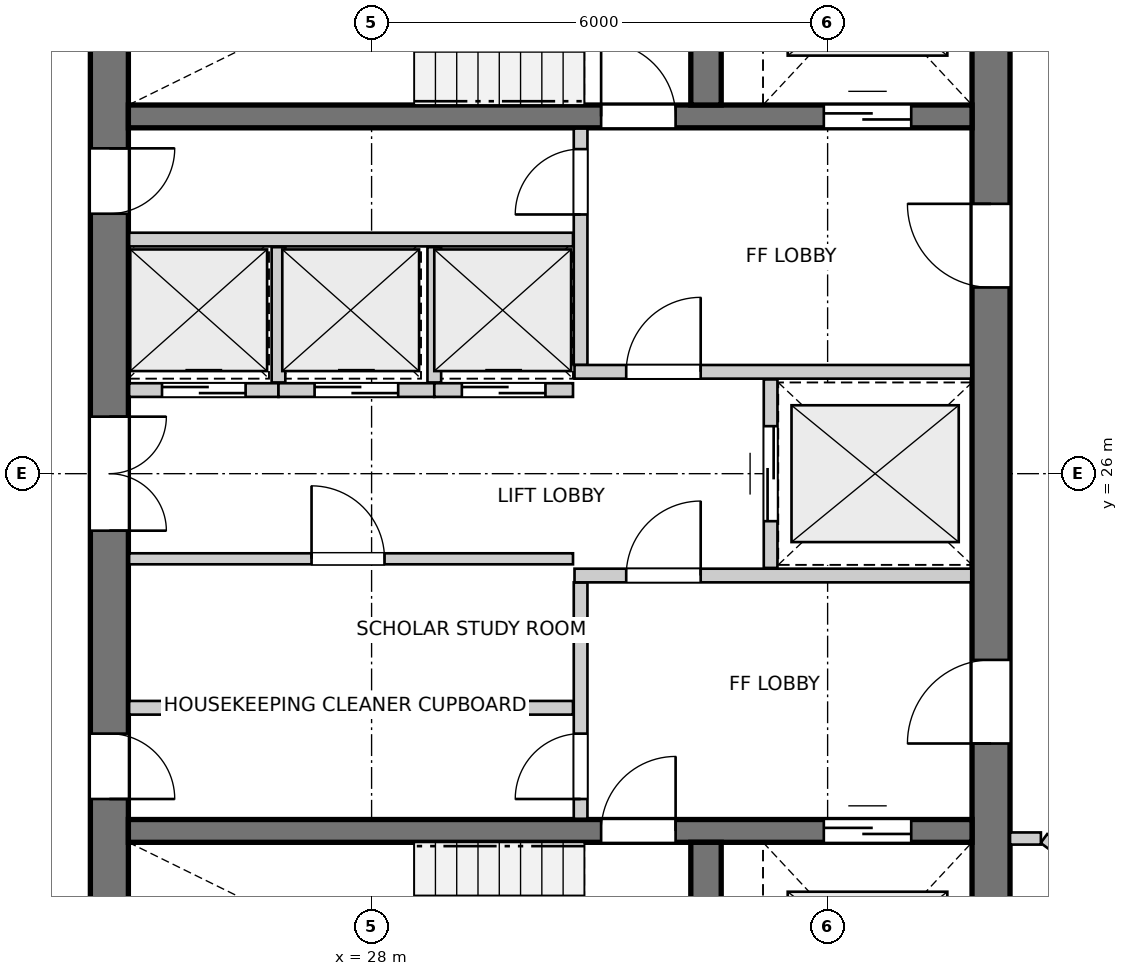
"""IFC4 building model, lengths in metres.
Left out: names, types, materials, properties, quantities, classifications, styles, units other than length and angle.
Written with IfcOpenShell. Run it as: python <this file> out.ifc"""

import sys

from ifc_helpers import new_model, si_unit, direction, frame, frame_2d, origin, place, context, subcontext, project, spatial, rectangle, extrude, source, transform, mapped, element, fill, save


model = new_model("IFC4")
c1 = context("Model", 3, precision=1e-05, world=origin(), true_north=direction((0.0, 1.0)))
c2 = subcontext(c1, "Body", "Model", "MODEL_VIEW")
j1 = project(units=[si_unit("LENGTHUNIT", "METRE"), si_unit("PLANEANGLEUNIT", "RADIAN")], contexts=[c1])
p1 = place(None, origin())
s1 = spatial("IfcSite", under=j1, at=p1, CompositionType="ELEMENT")
p2 = place(p1, origin())
s2 = spatial("IfcBuilding", under=s1, at=p2, CompositionType="ELEMENT")
p3 = place(p2, frame((0.0, 0.0, 198.8)))
s3 = spatial("IfcBuildingStorey", under=s2, at=p3, CompositionType="ELEMENT", Elevation=198.8)
p4 = place(p3, frame((24.55, 33.8, 0.0), z_axis=(0.0, 0.0, 1.0), x_axis=(0.0, -1.0, 0.0)))
e1 = element("IfcWall", 1, at=p4, inside=s3, PredefinedType="SHEAR", context=c2, shape_type="SweptSolid", body=[
    extrude(rectangle(XDim=15.6, YDim=0.5, at=frame_2d((7.8, 0.0))), origin(), (0.0, 0.0, 1.0), 2.96),
])
p5 = place(p4, frame((7.05, 0.0, 0.0)))
e2 = element("IfcOpeningElement", 2, at=p5, cuts=e1, PredefinedType="OPENING", context=c2, shape_type="SweptSolid", body=[
    extrude(rectangle(XDim=1.5, YDim=2.15, at=frame_2d((0.75, 1.075))), frame((0.0, 0.26, 0.0), z_axis=(0.0, -1.0, 0.0), x_axis=(1.0, 0.0, 0.0)), (0.0, 0.0, 1.0), 0.52),
])
p6 = place(p4, frame((3.52, 0.0, 0.0)))
e3 = element("IfcOpeningElement", 3, at=p6, cuts=e1, PredefinedType="OPENING", context=c2, shape_type="SweptSolid", body=[
    extrude(rectangle(XDim=0.86, YDim=2.05, at=frame_2d((0.43, 1.025))), frame((0.0, 0.26, 0.0), z_axis=(0.0, -1.0, 0.0), x_axis=(1.0, 0.0, 0.0)), (0.0, 0.0, 1.0), 0.52),
])
p7 = place(p4, frame((11.22, 0.0, 0.0)))
e4 = element("IfcOpeningElement", 4, at=p7, cuts=e1, PredefinedType="OPENING", context=c2, shape_type="SweptSolid", body=[
    extrude(rectangle(XDim=0.86, YDim=2.05, at=frame_2d((0.43, 1.025))), frame((0.0, 0.26, 0.0), z_axis=(0.0, -1.0, 0.0), x_axis=(1.0, 0.0, 0.0)), (0.0, 0.0, 1.0), 0.52),
])
p8 = place(p3, frame((36.15, 18.2, 0.0), z_axis=(0.0, 0.0, 1.0), x_axis=(0.0, 1.0, 0.0)))
e5 = element("IfcWall", 5, at=p8, inside=s3, PredefinedType="SHEAR", context=c2, shape_type="SweptSolid", body=[
    extrude(rectangle(XDim=15.6, YDim=0.5, at=frame_2d((7.8, 0.0))), origin(), (0.0, 0.0, 1.0), 2.96),
])
p9 = place(p8, frame((4.25, 0.0, 0.0)))
e6 = element("IfcOpeningElement", 6, at=p9, cuts=e5, PredefinedType="OPENING", context=c2, shape_type="SweptSolid", body=[
    extrude(rectangle(XDim=1.1, YDim=2.15, at=frame_2d((0.55, 1.075))), frame((0.0, 0.26, 0.0), z_axis=(0.0, -1.0, 0.0), x_axis=(1.0, 0.0, 0.0)), (0.0, 0.0, 1.0), 0.52),
])
p10 = place(p8, frame((10.25, 0.0, 0.0)))
e7 = element("IfcOpeningElement", 7, at=p10, cuts=e5, PredefinedType="OPENING", context=c2, shape_type="SweptSolid", body=[
    extrude(rectangle(XDim=1.1, YDim=2.15, at=frame_2d((0.55, 1.075))), frame((0.0, 0.26, 0.0), z_axis=(0.0, -1.0, 0.0), x_axis=(1.0, 0.0, 0.0)), (0.0, 0.0, 1.0), 0.52),
])
p11 = place(p3, frame((24.8, 21.3, 0.0), z_axis=(0.0, 0.0, 1.0), x_axis=(1.0, 0.0, 0.0)))
e8 = element("IfcWall", 8, at=p11, inside=s3, PredefinedType="SHEAR", context=c2, shape_type="SweptSolid", body=[
    extrude(rectangle(XDim=11.1, YDim=0.3, at=frame_2d((5.55, 0.0))), origin(), (0.0, 0.0, 1.0), 2.96),
])
p12 = place(p11, frame((6.22, 0.0, 0.0)))
e9 = element("IfcOpeningElement", 9, at=p12, cuts=e8, PredefinedType="OPENING", context=c2, shape_type="SweptSolid", body=[
    extrude(rectangle(XDim=0.98, YDim=2.15, at=frame_2d((0.49, 1.075))), frame((0.0, 0.16, 0.0), z_axis=(0.0, -1.0, 0.0), x_axis=(1.0, 0.0, 0.0)), (0.0, 0.0, 1.0), 0.32),
])
p13 = place(p11, frame((9.15, 0.0, 0.0)))
e10 = element("IfcOpeningElement", 10, at=p13, cuts=e8, PredefinedType="OPENING", context=c2, shape_type="SweptSolid", body=[
    extrude(rectangle(XDim=1.15, YDim=2.15, at=frame_2d((0.575, 1.075))), frame((0.0, 0.16, 0.0), z_axis=(0.0, -1.0, 0.0), x_axis=(1.0, 0.0, 0.0)), (0.0, 0.0, 1.0), 0.32),
])
p14 = place(p3, frame((32.4, 18.2, 0.0), z_axis=(0.0, 0.0, 1.0), x_axis=(0.0, 1.0, 0.0)))
e11 = element("IfcWall", 11, at=p14, inside=s3, PredefinedType="SHEAR", context=c2, shape_type="SweptSolid", body=[
    extrude(rectangle(XDim=2.95, YDim=0.4, at=frame_2d((1.475, 0.0))), origin(), (0.0, 0.0, 1.0), 2.96),
])
p15 = place(p3, frame((24.8, 30.7, 0.0), z_axis=(0.0, 0.0, 1.0), x_axis=(1.0, 0.0, 0.0)))
e12 = element("IfcWall", 12, at=p15, inside=s3, PredefinedType="SHEAR", context=c2, shape_type="SweptSolid", body=[
    extrude(rectangle(XDim=11.1, YDim=0.3, at=frame_2d((5.55, 0.0))), origin(), (0.0, 0.0, 1.0), 2.96),
])
p16 = place(p15, frame((6.22, 0.0, 0.0)))
e13 = element("IfcOpeningElement", 13, at=p16, cuts=e12, PredefinedType="OPENING", context=c2, shape_type="SweptSolid", body=[
    extrude(rectangle(XDim=0.98, YDim=2.15, at=frame_2d((0.49, 1.075))), frame((0.0, 0.16, 0.0), z_axis=(0.0, -1.0, 0.0), x_axis=(1.0, 0.0, 0.0)), (0.0, 0.0, 1.0), 0.32),
])
p17 = place(p15, frame((9.15, 0.0, 0.0)))
e14 = element("IfcOpeningElement", 14, at=p17, cuts=e12, PredefinedType="OPENING", context=c2, shape_type="SweptSolid", body=[
    extrude(rectangle(XDim=1.15, YDim=2.15, at=frame_2d((0.575, 1.075))), frame((0.0, 0.16, 0.0), z_axis=(0.0, -1.0, 0.0), x_axis=(1.0, 0.0, 0.0)), (0.0, 0.0, 1.0), 0.32),
])
p18 = place(p3, frame((32.4, 30.85, 0.0), z_axis=(0.0, 0.0, 1.0), x_axis=(0.0, 1.0, 0.0)))
e15 = element("IfcWall", 15, at=p18, inside=s3, PredefinedType="SHEAR", context=c2, shape_type="SweptSolid", body=[
    extrude(rectangle(XDim=2.95, YDim=0.4, at=frame_2d((1.475, 0.0))), origin(), (0.0, 0.0, 1.0), 2.96),
])
p19 = place(p3, frame((30.75, 21.46, 0.0), z_axis=(0.0, 0.0, 1.0), x_axis=(0.0, 1.0, 0.0)))
e16 = element("IfcWall", 16, at=p19, inside=s3, PredefinedType="PARTITIONING", context=c2, shape_type="SweptSolid", body=[
    extrude(rectangle(XDim=3.11, YDim=0.18, at=frame_2d((1.555, 0.0))), origin(), (0.0, 0.0, 1.0), 2.96),
])
p20 = place(p19, frame((0.26, 0.0, 0.0)))
e17 = element("IfcOpeningElement", 17, at=p20, cuts=e16, PredefinedType="OPENING", context=c2, shape_type="SweptSolid", body=[
    extrude(rectangle(XDim=0.86, YDim=2.05, at=frame_2d((0.43, 1.025))), frame((0.0, 0.1, 0.0), z_axis=(0.0, -1.0, 0.0), x_axis=(1.0, 0.0, 0.0)), (0.0, 0.0, 1.0), 0.2),
])
p21 = place(p3, frame((30.67, 24.66, 0.0), z_axis=(0.0, 0.0, 1.0), x_axis=(1.0, 0.0, 0.0)))
e18 = element("IfcWall", 18, at=p21, inside=s3, PredefinedType="PARTITIONING", context=c2, shape_type="SweptSolid", body=[
    extrude(rectangle(XDim=5.22, YDim=0.18, at=frame_2d((2.61, 0.0))), origin(), (0.0, 0.0, 1.0), 2.96),
])
p22 = place(p21, frame((0.68, 0.0, 0.0)))
e19 = element("IfcOpeningElement", 19, at=p22, cuts=e18, PredefinedType="OPENING", context=c2, shape_type="SweptSolid", body=[
    extrude(rectangle(XDim=0.98, YDim=2.15, at=frame_2d((0.49, 1.075))), frame((0.0, 0.1, 0.0), z_axis=(0.0, -1.0, 0.0), x_axis=(1.0, 0.0, 0.0)), (0.0, 0.0, 1.0), 0.2),
])
p23 = place(p3, frame((30.75, 27.43, 0.0), z_axis=(0.0, 0.0, 1.0), x_axis=(0.0, 1.0, 0.0)))
e20 = element("IfcWall", 20, at=p23, inside=s3, PredefinedType="PARTITIONING", context=c2, shape_type="SweptSolid", body=[
    extrude(rectangle(XDim=3.11, YDim=0.18, at=frame_2d((1.555, 0.0))), origin(), (0.0, 0.0, 1.0), 2.96),
])
p24 = place(p23, frame((1.98, 0.0, 0.0)))
e21 = element("IfcOpeningElement", 21, at=p24, cuts=e20, PredefinedType="OPENING", context=c2, shape_type="SweptSolid", body=[
    extrude(rectangle(XDim=0.86, YDim=2.05, at=frame_2d((0.43, 1.025))), frame((0.0, 0.1, 0.0), z_axis=(0.0, -1.0, 0.0), x_axis=(1.0, 0.0, 0.0)), (0.0, 0.0, 1.0), 0.2),
])
p25 = place(p3, frame((30.67, 27.34, 0.0), z_axis=(0.0, 0.0, 1.0), x_axis=(1.0, 0.0, 0.0)))
e22 = element("IfcWall", 22, at=p25, inside=s3, PredefinedType="PARTITIONING", context=c2, shape_type="SweptSolid", body=[
    extrude(rectangle(XDim=5.22, YDim=0.18, at=frame_2d((2.61, 0.0))), origin(), (0.0, 0.0, 1.0), 2.96),
])
p26 = place(p25, frame((0.68, 0.0, 0.0)))
e23 = element("IfcOpeningElement", 23, at=p26, cuts=e22, PredefinedType="OPENING", context=c2, shape_type="SweptSolid", body=[
    extrude(rectangle(XDim=0.98, YDim=2.15, at=frame_2d((0.49, 1.075))), frame((0.0, 0.1, 0.0), z_axis=(0.0, -1.0, 0.0), x_axis=(1.0, 0.0, 0.0)), (0.0, 0.0, 1.0), 0.2),
])
p27 = place(p3, frame((33.25, 24.76, 0.0), z_axis=(0.0, 0.0, 1.0), x_axis=(0.0, 1.0, 0.0)))
e24 = element("IfcWall", 24, at=p27, inside=s3, PredefinedType="PARTITIONING", context=c2, shape_type="SweptSolid", body=[
    extrude(rectangle(XDim=2.48, YDim=0.18, at=frame_2d((1.24, 0.0))), origin(), (0.0, 0.0, 1.0), 2.96),
])
p28 = place(p27, frame((0.615, 0.0, 0.0)))
e25 = element("IfcOpeningElement", 25, at=p28, cuts=e24, PredefinedType="OPENING", context=c2, shape_type="SweptSolid", body=[
    extrude(rectangle(XDim=1.25, YDim=2.15, at=frame_2d((0.625, 1.075))), frame((0.0, 0.1, 0.0), z_axis=(0.0, -1.0, 0.0), x_axis=(1.0, 0.0, 0.0)), (0.0, 0.0, 1.0), 0.2),
])
p29 = place(p3, frame((24.81, 22.92, 0.0), z_axis=(0.0, 0.0, 1.0), x_axis=(1.0, 0.0, 0.0)))
e26 = element("IfcWall", 26, at=p29, inside=s3, PredefinedType="PARTITIONING", context=c2, shape_type="SweptSolid", body=[
    extrude(rectangle(XDim=5.84, YDim=0.18, at=frame_2d((2.92, 0.0))), origin(), (0.0, 0.0, 1.0), 2.96),
])
p30 = place(p3, frame((24.81, 24.88, 0.0), z_axis=(0.0, 0.0, 1.0), x_axis=(1.0, 0.0, 0.0)))
e27 = element("IfcWall", 27, at=p30, inside=s3, PredefinedType="PARTITIONING", context=c2, shape_type="SweptSolid", body=[
    extrude(rectangle(XDim=5.84, YDim=0.145, at=frame_2d((2.92, 0.0))), origin(), (0.0, 0.0, 1.0), 2.96),
])
p31 = place(p30, frame((2.4, 0.0, 0.0)))
e28 = element("IfcOpeningElement", 28, at=p31, cuts=e27, PredefinedType="OPENING", context=c2, shape_type="SweptSolid", body=[
    extrude(rectangle(XDim=0.96, YDim=2.1, at=frame_2d((0.48, 1.05))), frame((0.0, 0.083, 0.0), z_axis=(0.0, -1.0, 0.0), x_axis=(1.0, 0.0, 0.0)), (0.0, 0.0, 1.0), 0.165),
])
p32 = place(p3, frame((24.81, 29.08, 0.0), z_axis=(0.0, 0.0, 1.0), x_axis=(1.0, 0.0, 0.0)))
e29 = element("IfcWall", 29, at=p32, inside=s3, PredefinedType="PARTITIONING", context=c2, shape_type="SweptSolid", body=[
    extrude(rectangle(XDim=5.84, YDim=0.18, at=frame_2d((2.92, 0.0))), origin(), (0.0, 0.0, 1.0), 2.96),
])
p33 = place(p3, frame((24.81, 27.1, 0.0), z_axis=(0.0, 0.0, 1.0), x_axis=(1.0, 0.0, 0.0)))
e30 = element("IfcWall", 30, at=p33, inside=s3, PredefinedType="PARTITIONING", context=c2, shape_type="SweptSolid", body=[
    extrude(rectangle(XDim=1.965, YDim=0.18, at=frame_2d((0.982, 0.0))), origin(), (0.0, 0.0, 1.0), 2.96),
])
p34 = place(p33, frame((0.433, 0.0, 0.0)))
e31 = element("IfcOpeningElement", 31, at=p34, cuts=e30, PredefinedType="OPENING", context=c2, shape_type="SweptSolid", body=[
    extrude(rectangle(XDim=1.1, YDim=2.15, at=frame_2d((0.55, 1.075))), frame((0.0, 0.1, 0.0), z_axis=(0.0, -1.0, 0.0), x_axis=(1.0, 0.0, 0.0)), (0.0, 0.0, 1.0), 0.2),
])
p35 = place(p3, frame((26.775, 27.1, 0.0), z_axis=(0.0, 0.0, 1.0), x_axis=(1.0, 0.0, 0.0)))
e32 = element("IfcWall", 32, at=p35, inside=s3, PredefinedType="PARTITIONING", context=c2, shape_type="SweptSolid", body=[
    extrude(rectangle(XDim=2.05, YDim=0.18, at=frame_2d((1.025, 0.0))), origin(), (0.0, 0.0, 1.0), 2.96),
])
p36 = place(p35, frame((0.475, 0.0, 0.0)))
e33 = element("IfcOpeningElement", 33, at=p36, cuts=e32, PredefinedType="OPENING", context=c2, shape_type="SweptSolid", body=[
    extrude(rectangle(XDim=1.1, YDim=2.15, at=frame_2d((0.55, 1.075))), frame((0.0, 0.1, 0.0), z_axis=(0.0, -1.0, 0.0), x_axis=(1.0, 0.0, 0.0)), (0.0, 0.0, 1.0), 0.2),
])
p37 = place(p3, frame((26.775, 27.2, 0.0), z_axis=(0.0, 0.0, 1.0), x_axis=(0.0, 1.0, 0.0)))
e34 = element("IfcWall", 34, at=p37, inside=s3, PredefinedType="PARTITIONING", context=c2, shape_type="SweptSolid", body=[
    extrude(rectangle(XDim=1.78, YDim=0.18, at=frame_2d((0.89, 0.0))), origin(), (0.0, 0.0, 1.0), 2.96),
])
p38 = place(p3, frame((28.825, 27.1, 0.0), z_axis=(0.0, 0.0, 1.0), x_axis=(1.0, 0.0, 0.0)))
e35 = element("IfcWall", 35, at=p38, inside=s3, PredefinedType="PARTITIONING", context=c2, shape_type="SweptSolid", body=[
    extrude(rectangle(XDim=1.825, YDim=0.18, at=frame_2d((0.913, 0.0))), origin(), (0.0, 0.0, 1.0), 2.96),
])
p39 = place(p38, frame((0.363, 0.0, 0.0)))
e36 = element("IfcOpeningElement", 36, at=p39, cuts=e35, PredefinedType="OPENING", context=c2, shape_type="SweptSolid", body=[
    extrude(rectangle(XDim=1.1, YDim=2.15, at=frame_2d((0.55, 1.075))), frame((0.0, 0.1, 0.0), z_axis=(0.0, -1.0, 0.0), x_axis=(1.0, 0.0, 0.0)), (0.0, 0.0, 1.0), 0.2),
])
p40 = place(p3, frame((28.825, 27.2, 0.0), z_axis=(0.0, 0.0, 1.0), x_axis=(0.0, 1.0, 0.0)))
e37 = element("IfcWall", 37, at=p40, inside=s3, PredefinedType="PARTITIONING", context=c2, shape_type="SweptSolid", body=[
    extrude(rectangle(XDim=1.78, YDim=0.18, at=frame_2d((0.89, 0.0))), origin(), (0.0, 0.0, 1.0), 2.96),
])
p41 = place(p3, frame((36.846, 21.2, 0.0), z_axis=(0.0, 0.0, 1.0), x_axis=(0.804250382672, -0.594290603974, 0.0)))
e38 = element("IfcWall", 38, at=p41, inside=s3, PredefinedType="PARTITIONING", context=c2, shape_type="SweptSolid", body=[
    extrude(rectangle(XDim=1.777, YDim=0.145, at=frame_2d((0.888, 0.0))), origin(), (0.0, 0.0, 1.0), 2.96),
])
p42 = place(p3, frame((36.4, 21.2, 0.0), z_axis=(0.0, 0.0, 1.0), x_axis=(1.0, 0.0, 0.0)))
e39 = element("IfcWall", 39, at=p42, inside=s3, PredefinedType="PARTITIONING", context=c2, shape_type="SweptSolid", body=[
    extrude(rectangle(XDim=0.406, YDim=0.16, at=frame_2d((0.203, 0.0))), origin(), (0.0, 0.0, 1.0), 2.96),
])
m1 = source(origin(), c2, "Body", "SweptSolid", [
    extrude(rectangle(XDim=0.98, YDim=2.15, at=frame_2d((0.49, 1.075))), frame((0.0, 0.025, 0.0), z_axis=(0.0, -1.0, 0.0), x_axis=(1.0, 0.0, 0.0)), (0.0, 0.0, 1.0), 0.05),
])
p43 = place(p12, origin())
e40 = element("IfcDoor", 40, at=p43, inside=s3, OperationType="SINGLE_SWING_RIGHT", PredefinedType="DOOR", context=c2, shape_type="MappedRepresentation", body=[
    mapped(m1, transform((0.0, 0.0, 0.0), x_axis=(1.0, 0.0, 0.0), y_axis=(0.0, 1.0, 0.0), z_axis=(0.0, 0.0, 1.0), scale=1.0)),
])
fill(e9, e40)
m2 = source(origin(), c2, "Body", "SweptSolid", [
    extrude(rectangle(XDim=1.15, YDim=2.15, at=frame_2d((0.575, 1.075))), frame((0.0, 0.025, 0.0), z_axis=(0.0, -1.0, 0.0), x_axis=(1.0, 0.0, 0.0)), (0.0, 0.0, 1.0), 0.05),
])
p44 = place(p13, origin())
e41 = element("IfcDoor", 41, at=p44, inside=s3, OperationType="DOUBLE_DOOR_SLIDING", PredefinedType="DOOR", context=c2, shape_type="MappedRepresentation", body=[
    mapped(m2, transform((0.0, 0.0, 0.0), x_axis=(1.0, 0.0, 0.0), y_axis=(0.0, 1.0, 0.0), z_axis=(0.0, 0.0, 1.0), scale=1.0)),
])
fill(e10, e41)
p45 = place(p16, origin())
e42 = element("IfcDoor", 42, at=p45, inside=s3, OperationType="SINGLE_SWING_LEFT", PredefinedType="DOOR", context=c2, shape_type="MappedRepresentation", body=[
    mapped(m1, transform((0.0, 0.0, 0.0), x_axis=(1.0, 0.0, 0.0), y_axis=(0.0, 1.0, 0.0), z_axis=(0.0, 0.0, 1.0), scale=1.0)),
])
fill(e13, e42)
p46 = place(p17, origin())
e43 = element("IfcDoor", 43, at=p46, inside=s3, OperationType="DOUBLE_DOOR_SLIDING", PredefinedType="DOOR", context=c2, shape_type="MappedRepresentation", body=[
    mapped(m2, transform((0.0, 0.0, 0.0), x_axis=(1.0, 0.0, 0.0), y_axis=(0.0, 1.0, 0.0), z_axis=(0.0, 0.0, 1.0), scale=1.0)),
])
fill(e14, e43)
m3 = source(origin(), c2, "Body", "SweptSolid", [
    extrude(rectangle(XDim=1.1, YDim=2.15, at=frame_2d((0.55, 1.075))), frame((0.0, 0.025, 0.0), z_axis=(0.0, -1.0, 0.0), x_axis=(1.0, 0.0, 0.0)), (0.0, 0.0, 1.0), 0.05),
])
p47 = place(p9, origin())
e44 = element("IfcDoor", 44, at=p47, inside=s3, OperationType="SINGLE_SWING_LEFT", PredefinedType="DOOR", context=c2, shape_type="MappedRepresentation", body=[
    mapped(m3, transform((0.0, 0.0, 0.0), x_axis=(1.0, 0.0, 0.0), y_axis=(0.0, 1.0, 0.0), z_axis=(0.0, 0.0, 1.0), scale=1.0)),
])
fill(e6, e44)
p48 = place(p10, origin())
e45 = element("IfcDoor", 45, at=p48, inside=s3, OperationType="SINGLE_SWING_RIGHT", PredefinedType="DOOR", context=c2, shape_type="MappedRepresentation", body=[
    mapped(m3, transform((0.0, 0.0, 0.0), x_axis=(1.0, 0.0, 0.0), y_axis=(0.0, 1.0, 0.0), z_axis=(0.0, 0.0, 1.0), scale=1.0)),
])
fill(e7, e45)
m4 = source(origin(), c2, "Body", "SweptSolid", [
    extrude(rectangle(XDim=1.5, YDim=2.15, at=frame_2d((0.75, 1.075))), frame((0.0, 0.025, 0.0), z_axis=(0.0, -1.0, 0.0), x_axis=(1.0, 0.0, 0.0)), (0.0, 0.0, 1.0), 0.05),
])
p49 = place(p5, origin())
e46 = element("IfcDoor", 46, at=p49, inside=s3, OperationType="DOUBLE_DOOR_SINGLE_SWING", PredefinedType="DOOR", context=c2, shape_type="MappedRepresentation", body=[
    mapped(m4, transform((0.0, 0.0, 0.0), x_axis=(1.0, 0.0, 0.0), y_axis=(0.0, 1.0, 0.0), z_axis=(0.0, 0.0, 1.0), scale=1.0)),
])
fill(e2, e46)
m5 = source(origin(), c2, "Body", "SweptSolid", [
    extrude(rectangle(XDim=0.86, YDim=2.05, at=frame_2d((0.43, 1.025))), frame((0.0, 0.025, 0.0), z_axis=(0.0, -1.0, 0.0), x_axis=(1.0, 0.0, 0.0)), (0.0, 0.0, 1.0), 0.05),
])
p50 = place(p6, origin())
e47 = element("IfcDoor", 47, at=p50, inside=s3, OperationType="SINGLE_SWING_LEFT", PredefinedType="DOOR", context=c2, shape_type="MappedRepresentation", body=[
    mapped(m5, transform((0.0, 0.0, 0.0), x_axis=(1.0, 0.0, 0.0), y_axis=(0.0, 1.0, 0.0), z_axis=(0.0, 0.0, 1.0), scale=1.0)),
])
fill(e3, e47)
p51 = place(p7, origin())
e48 = element("IfcDoor", 48, at=p51, inside=s3, OperationType="SINGLE_SWING_RIGHT", PredefinedType="DOOR", context=c2, shape_type="MappedRepresentation", body=[
    mapped(m5, transform((0.0, 0.0, 0.0), x_axis=(1.0, 0.0, 0.0), y_axis=(0.0, 1.0, 0.0), z_axis=(0.0, 0.0, 1.0), scale=1.0)),
])
fill(e4, e48)
p52 = place(p20, origin())
e49 = element("IfcDoor", 49, at=p52, inside=s3, OperationType="SINGLE_SWING_LEFT", PredefinedType="DOOR", context=c2, shape_type="MappedRepresentation", body=[
    mapped(m5, transform((0.0, 0.0, 0.0), x_axis=(1.0, 0.0, 0.0), y_axis=(0.0, 1.0, 0.0), z_axis=(0.0, 0.0, 1.0), scale=1.0)),
])
fill(e17, e49)
p53 = place(p22, origin())
e50 = element("IfcDoor", 50, at=p53, inside=s3, OperationType="SINGLE_SWING_RIGHT", PredefinedType="DOOR", context=c2, shape_type="MappedRepresentation", body=[
    mapped(m1, transform((0.0, 0.0, 0.0), x_axis=(1.0, 0.0, 0.0), y_axis=(0.0, 1.0, 0.0), z_axis=(0.0, 0.0, 1.0), scale=1.0)),
])
fill(e19, e50)
p54 = place(p24, origin())
e51 = element("IfcDoor", 51, at=p54, inside=s3, OperationType="SINGLE_SWING_LEFT", PredefinedType="DOOR", context=c2, shape_type="MappedRepresentation", body=[
    mapped(m5, transform((0.0, 0.0, 0.0), x_axis=(1.0, 0.0, 0.0), y_axis=(0.0, 1.0, 0.0), z_axis=(0.0, 0.0, 1.0), scale=1.0)),
])
fill(e21, e51)
p55 = place(p26, origin())
e52 = element("IfcDoor", 52, at=p55, inside=s3, OperationType="SINGLE_SWING_RIGHT", PredefinedType="DOOR", context=c2, shape_type="MappedRepresentation", body=[
    mapped(m1, transform((0.0, 0.0, 0.0), x_axis=(1.0, 0.0, 0.0), y_axis=(0.0, 1.0, 0.0), z_axis=(0.0, 0.0, 1.0), scale=1.0)),
])
fill(e23, e52)
m6 = source(origin(), c2, "Body", "SweptSolid", [
    extrude(rectangle(XDim=1.25, YDim=2.15, at=frame_2d((0.625, 1.075))), frame((0.0, 0.025, 0.0), z_axis=(0.0, -1.0, 0.0), x_axis=(1.0, 0.0, 0.0)), (0.0, 0.0, 1.0), 0.05),
])
p56 = place(p28, origin())
e53 = element("IfcDoor", 53, at=p56, inside=s3, OperationType="DOUBLE_DOOR_SLIDING", PredefinedType="DOOR", context=c2, shape_type="MappedRepresentation", body=[
    mapped(m6, transform((0.0, 0.0, 0.0), x_axis=(1.0, 0.0, 0.0), y_axis=(0.0, 1.0, 0.0), z_axis=(0.0, 0.0, 1.0), scale=1.0)),
])
fill(e25, e53)
m7 = source(origin(), c2, "Body", "SweptSolid", [
    extrude(rectangle(XDim=0.96, YDim=2.1, at=frame_2d((0.48, 1.05))), frame((0.0, 0.025, 0.0), z_axis=(0.0, -1.0, 0.0), x_axis=(1.0, 0.0, 0.0)), (0.0, 0.0, 1.0), 0.05),
])
p57 = place(p31, origin())
e54 = element("IfcDoor", 54, at=p57, inside=s3, OperationType="SINGLE_SWING_LEFT", PredefinedType="DOOR", context=c2, shape_type="MappedRepresentation", body=[
    mapped(m7, transform((0.0, 0.0, 0.0), x_axis=(1.0, 0.0, 0.0), y_axis=(0.0, 1.0, 0.0), z_axis=(0.0, 0.0, 1.0), scale=1.0)),
])
fill(e28, e54)
p58 = place(p34, origin())
e55 = element("IfcDoor", 55, at=p58, inside=s3, OperationType="DOUBLE_DOOR_SLIDING", PredefinedType="DOOR", context=c2, shape_type="MappedRepresentation", body=[
    mapped(m3, transform((0.0, 0.0, 0.0), x_axis=(1.0, 0.0, 0.0), y_axis=(0.0, 1.0, 0.0), z_axis=(0.0, 0.0, 1.0), scale=1.0)),
])
fill(e31, e55)
p59 = place(p36, origin())
e56 = element("IfcDoor", 56, at=p59, inside=s3, OperationType="DOUBLE_DOOR_SLIDING", PredefinedType="DOOR", context=c2, shape_type="MappedRepresentation", body=[
    mapped(m3, transform((0.0, 0.0, 0.0), x_axis=(1.0, 0.0, 0.0), y_axis=(0.0, 1.0, 0.0), z_axis=(0.0, 0.0, 1.0), scale=1.0)),
])
fill(e33, e56)
p60 = place(p39, origin())
e57 = element("IfcDoor", 57, at=p60, inside=s3, OperationType="DOUBLE_DOOR_SLIDING", PredefinedType="DOOR", context=c2, shape_type="MappedRepresentation", body=[
    mapped(m3, transform((0.0, 0.0, 0.0), x_axis=(1.0, 0.0, 0.0), y_axis=(0.0, 1.0, 0.0), z_axis=(0.0, 0.0, 1.0), scale=1.0)),
])
fill(e36, e57)
save(model, sys.argv[1])
